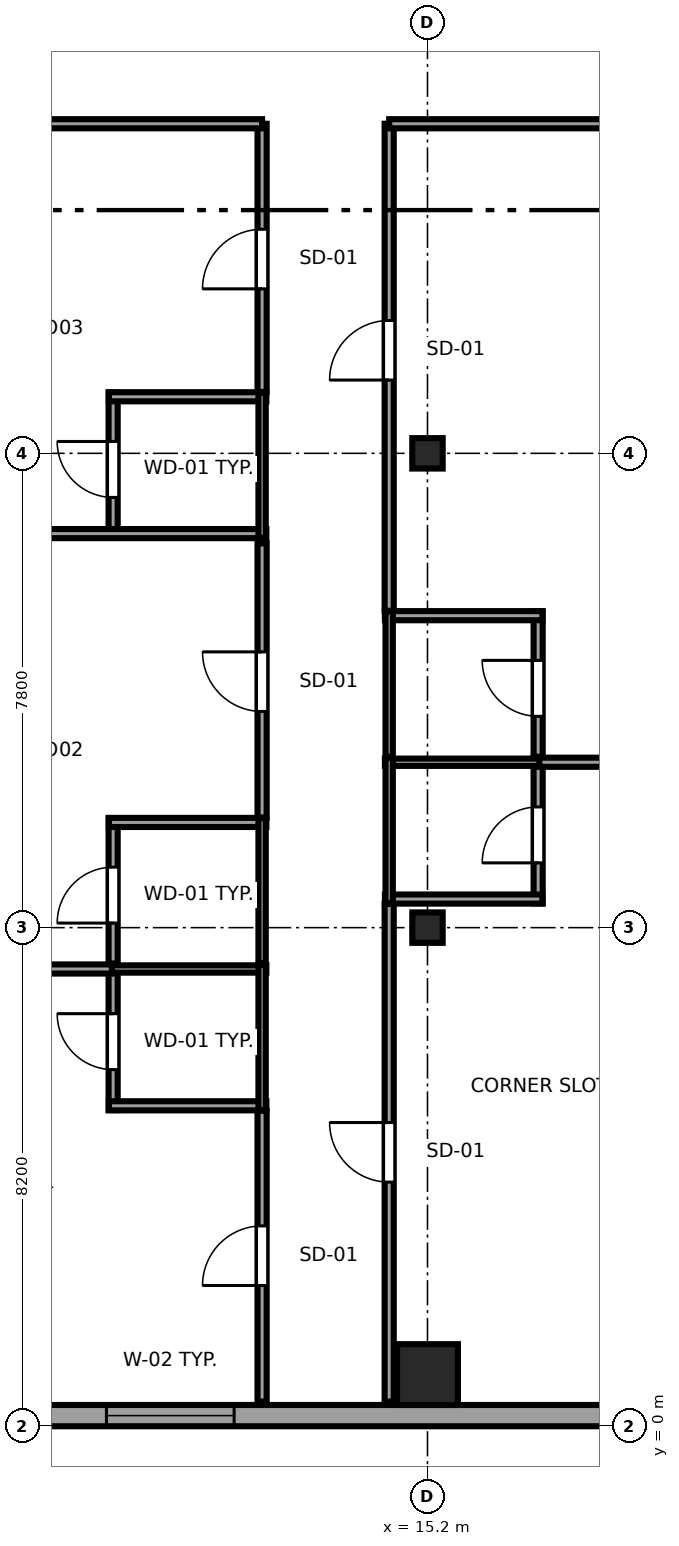
"""IFC4 building model, lengths in metres.
Left out: names, types, materials, properties, quantities, classifications, styles, units other than length and angle.
Written with IfcOpenShell. Run it as: python <this file> out.ifc"""

import sys

from ifc_helpers import new_model, si_unit, direction, frame, frame_2d, origin, origin_2d, place, context, subcontext, project, spatial, rectangle, i_section, extrude, source, transform, mapped, element, fill, save


model = new_model("IFC4")
c1 = context("Model", 3, precision=1e-05, world=origin(), true_north=direction((0.0, 1.0)))
c2 = subcontext(c1, "Body", "Model", "MODEL_VIEW")
j1 = project(units=[si_unit("LENGTHUNIT", "METRE"), si_unit("PLANEANGLEUNIT", "RADIAN")], contexts=[c1])
p1 = place(None, origin())
s1 = spatial("IfcSite", under=j1, at=p1, CompositionType="ELEMENT")
p2 = place(p1, origin())
s2 = spatial("IfcBuilding", under=s1, at=p2, CompositionType="ELEMENT")
p3 = place(p2, frame((0.0, 0.0, 53.3)))
s3 = spatial("IfcBuildingStorey", under=s2, at=p3, CompositionType="ELEMENT", Elevation=53.3)
m1 = source(origin(), c2, "Body", "SweptSolid", [
    extrude(rectangle(XDim=1.0, YDim=1.0, at=origin_2d()), origin(), (0.0, 0.0, 1.0), 3.55),
])
p4 = place(p3, frame((15.2, 0.85, 0.0), z_axis=(0.0, 0.0, 1.0), x_axis=(1.0, 0.0, 0.0)))
e1 = element("IfcColumn", 1, at=p4, inside=s3, PredefinedType="COLUMN", context=c2, shape_type="MappedRepresentation", body=[
    mapped(m1, transform((0.0, 0.0, 0.0), x_axis=(1.0, 0.0, 0.0), y_axis=(0.0, 1.0, 0.0), z_axis=(0.0, 0.0, 1.0), scale=1.0)),
])
m2 = source(origin(), c2, "Body", "SweptSolid", [
    extrude(i_section(OverallWidth=0.5, OverallDepth=0.5, WebThickness=0.028, FlangeThickness=0.045, at=origin_2d()), origin(), (0.0, 0.0, 1.0), 3.55),
])
for number, where, z_axis, x_axis in (
    (2, (15.2, 8.2, 0.0), (0.0, 0.0, 1.0), (1.0, 0.0, 0.0)),
    (3, (15.2, 16.0, 0.0), (0.0, 0.0, 1.0), (1.0, 0.0, 0.0)),
):
    element("IfcColumn", number, at=place(p3, frame(where, z_axis=z_axis, x_axis=x_axis)), inside=s3, PredefinedType="COLUMN", context=c2, shape_type="MappedRepresentation", body=[
        mapped(m2, transform((0.0, 0.0, 0.0), x_axis=(1.0, 0.0, 0.0), y_axis=(0.0, 1.0, 0.0), z_axis=(0.0, 0.0, 1.0), scale=1.0)),
    ])
p5 = place(p3, frame((4.617, 0.175, 0.0), z_axis=(0.0, 0.0, 1.0), x_axis=(1.0, 0.0, 0.0)))
e4 = element("IfcWall", 4, at=p5, inside=s3, PredefinedType="SOLIDWALL", context=c2, shape_type="SweptSolid", body=[
    extrude(rectangle(XDim=18.008, YDim=0.35, at=frame_2d((9.004, 0.0))), origin(), (0.0, 0.0, 1.0), 3.37),
])
p6 = place(p5, frame((5.303, 0.0, 0.68)))
e5 = element("IfcOpeningElement", 5, at=p6, cuts=e4, PredefinedType="OPENING", context=c2, shape_type="SweptSolid", body=[
    extrude(rectangle(XDim=2.1, YDim=1.9, at=frame_2d((1.05, 0.95))), frame((0.0, 0.185, 0.0), z_axis=(0.0, -1.0, 0.0), x_axis=(1.0, 0.0, 0.0)), (0.0, 0.0, 1.0), 0.37),
])
p7 = place(p5, frame((14.257, 0.0, 0.68)))
e6 = element("IfcOpeningElement", 6, at=p7, cuts=e4, PredefinedType="OPENING", context=c2, shape_type="SweptSolid", body=[
    extrude(rectangle(XDim=2.1, YDim=1.9, at=frame_2d((1.05, 0.95))), frame((0.0, 0.185, 0.0), z_axis=(0.0, -1.0, 0.0), x_axis=(1.0, 0.0, 0.0)), (0.0, 0.0, 1.0), 0.37),
])
p8 = place(p3, frame((10.03, 5.2, 0.0), z_axis=(0.0, 0.0, 1.0), x_axis=(0.0, 1.0, 0.0)))
e7 = element("IfcWall", 7, at=p8, inside=s3, PredefinedType="PARTITIONING", context=c2, shape_type="SweptSolid", body=[
    extrude(rectangle(XDim=2.39, YDim=0.15, at=frame_2d((1.195, 0.0))), origin(), (0.0, 0.0, 1.0), 3.37),
])
p9 = place(p8, frame((0.665, 0.0, 0.0)))
e8 = element("IfcOpeningElement", 8, at=p9, cuts=e7, PredefinedType="OPENING", context=c2, shape_type="SweptSolid", body=[
    extrude(rectangle(XDim=0.92, YDim=2.01, at=frame_2d((0.46, 1.005))), frame((0.0, 0.085, 0.0), z_axis=(0.0, -1.0, 0.0), x_axis=(1.0, 0.0, 0.0)), (0.0, 0.0, 1.0), 0.17),
])
p10 = place(p3, frame((9.96, 5.27, 0.0), z_axis=(0.0, 0.0, 1.0), x_axis=(1.0, 0.0, 0.0)))
e9 = element("IfcWall", 9, at=p10, inside=s3, PredefinedType="PARTITIONING", context=c2, shape_type="SweptSolid", body=[
    extrude(rectangle(XDim=2.59, YDim=0.15, at=frame_2d((1.295, 0.0))), origin(), (0.0, 0.0, 1.0), 3.37),
])
p11 = place(p3, frame((9.96, 7.52, 0.0), z_axis=(0.0, 0.0, 1.0), x_axis=(1.0, 0.0, 0.0)))
e10 = element("IfcWall", 10, at=p11, inside=s3, PredefinedType="PLUMBINGWALL", context=c2, shape_type="SweptSolid", body=[
    extrude(rectangle(XDim=2.59, YDim=0.12, at=frame_2d((1.295, 0.0))), origin(), (0.0, 0.0, 1.0), 3.37),
])
p12 = place(p3, frame((12.48, 5.2, 0.0), z_axis=(0.0, 0.0, 1.0), x_axis=(0.0, 1.0, 0.0)))
e11 = element("IfcWall", 11, at=p12, inside=s3, PredefinedType="PLUMBINGWALL", context=c2, shape_type="SweptSolid", body=[
    extrude(rectangle(XDim=2.39, YDim=0.12, at=frame_2d((1.195, 0.0))), origin(), (0.0, 0.0, 1.0), 3.37),
])
p13 = place(p3, frame((10.03, 7.61, 0.0), z_axis=(0.0, 0.0, 1.0), x_axis=(0.0, 1.0, 0.0)))
e12 = element("IfcWall", 12, at=p13, inside=s3, PredefinedType="PARTITIONING", context=c2, shape_type="SweptSolid", body=[
    extrude(rectangle(XDim=2.39, YDim=0.15, at=frame_2d((1.195, 0.0))), origin(), (0.0, 0.0, 1.0), 3.37),
])
p14 = place(p13, frame((0.665, 0.0, 0.0)))
e13 = element("IfcOpeningElement", 13, at=p14, cuts=e12, PredefinedType="OPENING", context=c2, shape_type="SweptSolid", body=[
    extrude(rectangle(XDim=0.92, YDim=2.01, at=frame_2d((0.46, 1.005))), frame((0.0, 0.085, 0.0), z_axis=(0.0, -1.0, 0.0), x_axis=(1.0, 0.0, 0.0)), (0.0, 0.0, 1.0), 0.17),
])
p15 = place(p3, frame((9.96, 9.93, 0.0), z_axis=(0.0, 0.0, 1.0), x_axis=(1.0, 0.0, 0.0)))
e14 = element("IfcWall", 14, at=p15, inside=s3, PredefinedType="PARTITIONING", context=c2, shape_type="SweptSolid", body=[
    extrude(rectangle(XDim=2.59, YDim=0.15, at=frame_2d((1.295, 0.0))), origin(), (0.0, 0.0, 1.0), 3.37),
])
p16 = place(p3, frame((12.48, 7.61, 0.0), z_axis=(0.0, 0.0, 1.0), x_axis=(0.0, 1.0, 0.0)))
e15 = element("IfcWall", 15, at=p16, inside=s3, PredefinedType="PLUMBINGWALL", context=c2, shape_type="SweptSolid", body=[
    extrude(rectangle(XDim=2.39, YDim=0.12, at=frame_2d((1.195, 0.0))), origin(), (0.0, 0.0, 1.0), 3.37),
])
p17 = place(p3, frame((10.03, 14.61, 0.0), z_axis=(0.0, 0.0, 1.0), x_axis=(0.0, 1.0, 0.0)))
e16 = element("IfcWall", 16, at=p17, inside=s3, PredefinedType="PARTITIONING", context=c2, shape_type="SweptSolid", body=[
    extrude(rectangle(XDim=2.39, YDim=0.15, at=frame_2d((1.195, 0.0))), origin(), (0.0, 0.0, 1.0), 3.37),
])
p18 = place(p17, frame((0.665, 0.0, 0.0)))
e17 = element("IfcOpeningElement", 17, at=p18, cuts=e16, PredefinedType="OPENING", context=c2, shape_type="SweptSolid", body=[
    extrude(rectangle(XDim=0.92, YDim=2.01, at=frame_2d((0.46, 1.005))), frame((0.0, 0.085, 0.0), z_axis=(0.0, -1.0, 0.0), x_axis=(1.0, 0.0, 0.0)), (0.0, 0.0, 1.0), 0.17),
])
p19 = place(p3, frame((0.3, 14.68, 0.0), z_axis=(0.0, 0.0, 1.0), x_axis=(1.0, 0.0, 0.0)))
e18 = element("IfcWall", 18, at=p19, inside=s3, PredefinedType="PARTITIONING", context=c2, shape_type="SweptSolid", body=[
    extrude(rectangle(XDim=12.25, YDim=0.15, at=frame_2d((6.125, 0.0))), origin(), (0.0, 0.0, 1.0), 3.37),
])
p20 = place(p3, frame((9.96, 16.93, 0.0), z_axis=(0.0, 0.0, 1.0), x_axis=(1.0, 0.0, 0.0)))
e19 = element("IfcWall", 19, at=p20, inside=s3, PredefinedType="PARTITIONING", context=c2, shape_type="SweptSolid", body=[
    extrude(rectangle(XDim=2.59, YDim=0.15, at=frame_2d((1.295, 0.0))), origin(), (0.0, 0.0, 1.0), 3.37),
])
p21 = place(p3, frame((12.48, 14.61, 0.0), z_axis=(0.0, 0.0, 1.0), x_axis=(0.0, 1.0, 0.0)))
e20 = element("IfcWall", 20, at=p21, inside=s3, PredefinedType="PLUMBINGWALL", context=c2, shape_type="SweptSolid", body=[
    extrude(rectangle(XDim=2.39, YDim=0.12, at=frame_2d((1.195, 0.0))), origin(), (0.0, 0.0, 1.0), 3.37),
])
p22 = place(p3, frame((17.02, 8.6, 0.0), z_axis=(0.0, 0.0, 1.0), x_axis=(0.0, 1.0, 0.0)))
e21 = element("IfcWall", 21, at=p22, inside=s3, PredefinedType="PARTITIONING", context=c2, shape_type="SweptSolid", body=[
    extrude(rectangle(XDim=2.39, YDim=0.15, at=frame_2d((1.195, 0.0))), origin(), (0.0, 0.0, 1.0), 3.37),
])
p23 = place(p22, frame((0.665, 0.0, 0.0)))
e22 = element("IfcOpeningElement", 22, at=p23, cuts=e21, PredefinedType="OPENING", context=c2, shape_type="SweptSolid", body=[
    extrude(rectangle(XDim=0.92, YDim=2.01, at=frame_2d((0.46, 1.005))), frame((0.0, 0.085, 0.0), z_axis=(0.0, -1.0, 0.0), x_axis=(1.0, 0.0, 0.0)), (0.0, 0.0, 1.0), 0.17),
])
p24 = place(p3, frame((14.5, 8.67, 0.0), z_axis=(0.0, 0.0, 1.0), x_axis=(1.0, 0.0, 0.0)))
e23 = element("IfcWall", 23, at=p24, inside=s3, PredefinedType="PARTITIONING", context=c2, shape_type="SweptSolid", body=[
    extrude(rectangle(XDim=2.59, YDim=0.15, at=frame_2d((1.295, 0.0))), origin(), (0.0, 0.0, 1.0), 3.37),
])
p25 = place(p3, frame((14.5, 10.92, 0.0), z_axis=(0.0, 0.0, 1.0), x_axis=(1.0, 0.0, 0.0)))
e24 = element("IfcWall", 24, at=p25, inside=s3, PredefinedType="PLUMBINGWALL", context=c2, shape_type="SweptSolid", body=[
    extrude(rectangle(XDim=2.59, YDim=0.12, at=frame_2d((1.295, 0.0))), origin(), (0.0, 0.0, 1.0), 3.37),
])
p26 = place(p3, frame((14.57, 8.6, 0.0), z_axis=(0.0, 0.0, 1.0), x_axis=(0.0, 1.0, 0.0)))
e25 = element("IfcWall", 25, at=p26, inside=s3, PredefinedType="PLUMBINGWALL", context=c2, shape_type="SweptSolid", body=[
    extrude(rectangle(XDim=2.39, YDim=0.12, at=frame_2d((1.195, 0.0))), origin(), (0.0, 0.0, 1.0), 3.37),
])
p27 = place(p3, frame((17.02, 11.01, 0.0), z_axis=(0.0, 0.0, 1.0), x_axis=(0.0, 1.0, 0.0)))
e26 = element("IfcWall", 26, at=p27, inside=s3, PredefinedType="PARTITIONING", context=c2, shape_type="SweptSolid", body=[
    extrude(rectangle(XDim=2.39, YDim=0.15, at=frame_2d((1.195, 0.0))), origin(), (0.0, 0.0, 1.0), 3.37),
])
p28 = place(p27, frame((0.665, 0.0, 0.0)))
e27 = element("IfcOpeningElement", 27, at=p28, cuts=e26, PredefinedType="OPENING", context=c2, shape_type="SweptSolid", body=[
    extrude(rectangle(XDim=0.92, YDim=2.01, at=frame_2d((0.46, 1.005))), frame((0.0, 0.085, 0.0), z_axis=(0.0, -1.0, 0.0), x_axis=(1.0, 0.0, 0.0)), (0.0, 0.0, 1.0), 0.17),
])
p29 = place(p3, frame((14.5, 13.33, 0.0), z_axis=(0.0, 0.0, 1.0), x_axis=(1.0, 0.0, 0.0)))
e28 = element("IfcWall", 28, at=p29, inside=s3, PredefinedType="PARTITIONING", context=c2, shape_type="SweptSolid", body=[
    extrude(rectangle(XDim=2.59, YDim=0.15, at=frame_2d((1.295, 0.0))), origin(), (0.0, 0.0, 1.0), 3.37),
])
p30 = place(p3, frame((14.57, 11.01, 0.0), z_axis=(0.0, 0.0, 1.0), x_axis=(0.0, 1.0, 0.0)))
e29 = element("IfcWall", 29, at=p30, inside=s3, PredefinedType="PLUMBINGWALL", context=c2, shape_type="SweptSolid", body=[
    extrude(rectangle(XDim=2.39, YDim=0.12, at=frame_2d((1.195, 0.0))), origin(), (0.0, 0.0, 1.0), 3.37),
])
p31 = place(p3, frame((12.48, 0.405, 0.0), z_axis=(0.0, 0.0, 1.0), x_axis=(0.0, 1.0, 0.0)))
e30 = element("IfcWall", 30, at=p31, inside=s3, PredefinedType="PARTITIONING", context=c2, shape_type="SweptSolid", body=[
    extrude(rectangle(XDim=4.785, YDim=0.15, at=frame_2d((2.393, 0.0))), origin(), (0.0, 0.0, 1.0), 3.37),
])
p32 = place(p31, frame((1.91, 0.0, 0.0)))
e31 = element("IfcOpeningElement", 31, at=p32, cuts=e30, PredefinedType="OPENING", context=c2, shape_type="SweptSolid", body=[
    extrude(rectangle(XDim=0.98, YDim=2.12, at=frame_2d((0.49, 1.06))), frame((0.0, 0.085, 0.0), z_axis=(0.0, -1.0, 0.0), x_axis=(1.0, 0.0, 0.0)), (0.0, 0.0, 1.0), 0.17),
])
p33 = place(p3, frame((0.3, 7.52, 0.0), z_axis=(0.0, 0.0, 1.0), x_axis=(1.0, 0.0, 0.0)))
e32 = element("IfcWall", 32, at=p33, inside=s3, PredefinedType="PARTITIONING", context=c2, shape_type="SweptSolid", body=[
    extrude(rectangle(XDim=9.71, YDim=0.15, at=frame_2d((4.855, 0.0))), origin(), (0.0, 0.0, 1.0), 3.37),
])
p34 = place(p3, frame((12.48, 10.01, 0.0), z_axis=(0.0, 0.0, 1.0), x_axis=(0.0, 1.0, 0.0)))
e33 = element("IfcWall", 33, at=p34, inside=s3, PredefinedType="PARTITIONING", context=c2, shape_type="SweptSolid", body=[
    extrude(rectangle(XDim=4.51, YDim=0.15, at=frame_2d((2.255, 0.0))), origin(), (0.0, 0.0, 1.0), 3.37),
])
p35 = place(p34, frame((1.745, 0.0, 0.0)))
e34 = element("IfcOpeningElement", 34, at=p35, cuts=e33, PredefinedType="OPENING", context=c2, shape_type="SweptSolid", body=[
    extrude(rectangle(XDim=0.98, YDim=2.12, at=frame_2d((0.49, 1.06))), frame((0.0, 0.085, 0.0), z_axis=(0.0, -1.0, 0.0), x_axis=(1.0, 0.0, 0.0)), (0.0, 0.0, 1.0), 0.17),
])
p36 = place(p3, frame((12.48, 17.01, 0.0), z_axis=(0.0, 0.0, 1.0), x_axis=(0.0, 1.0, 0.0)))
e35 = element("IfcWall", 35, at=p36, inside=s3, PredefinedType="PARTITIONING", context=c2, shape_type="SweptSolid", body=[
    extrude(rectangle(XDim=4.41, YDim=0.15, at=frame_2d((2.205, 0.0))), origin(), (0.0, 0.0, 1.0), 3.37),
])
p37 = place(p36, frame((1.695, 0.0, 0.0)))
e36 = element("IfcOpeningElement", 36, at=p37, cuts=e35, PredefinedType="OPENING", context=c2, shape_type="SweptSolid", body=[
    extrude(rectangle(XDim=0.98, YDim=2.12, at=frame_2d((0.49, 1.06))), frame((0.0, 0.085, 0.0), z_axis=(0.0, -1.0, 0.0), x_axis=(1.0, 0.0, 0.0)), (0.0, 0.0, 1.0), 0.17),
])
p38 = place(p3, frame((0.3, 21.42, 0.0), z_axis=(0.0, 0.0, 1.0), x_axis=(1.0, 0.0, 0.0)))
e37 = element("IfcWall", 37, at=p38, inside=s3, PredefinedType="PARTITIONING", context=c2, shape_type="SweptSolid", body=[
    extrude(rectangle(XDim=12.18, YDim=0.15, at=frame_2d((6.09, 0.0))), origin(), (0.0, 0.0, 1.0), 3.37),
])
p39 = place(p3, frame((14.57, 0.405, 0.0), z_axis=(0.0, 0.0, 1.0), x_axis=(0.0, 1.0, 0.0)))
e38 = element("IfcWall", 38, at=p39, inside=s3, PredefinedType="PARTITIONING", context=c2, shape_type="SweptSolid", body=[
    extrude(rectangle(XDim=8.185, YDim=0.15, at=frame_2d((4.093, 0.0))), origin(), (0.0, 0.0, 1.0), 3.37),
])
p40 = place(p39, frame((3.61, 0.0, 0.0)))
e39 = element("IfcOpeningElement", 39, at=p40, cuts=e38, PredefinedType="OPENING", context=c2, shape_type="SweptSolid", body=[
    extrude(rectangle(XDim=0.98, YDim=2.12, at=frame_2d((0.49, 1.06))), frame((0.0, 0.085, 0.0), z_axis=(0.0, -1.0, 0.0), x_axis=(1.0, 0.0, 0.0)), (0.0, 0.0, 1.0), 0.17),
])
p41 = place(p3, frame((17.04, 10.92, 0.0), z_axis=(0.0, 0.0, 1.0), x_axis=(1.0, 0.0, 0.0)))
e40 = element("IfcWall", 40, at=p41, inside=s3, PredefinedType="PARTITIONING", context=c2, shape_type="SweptSolid", body=[
    extrude(rectangle(XDim=5.31, YDim=0.15, at=frame_2d((2.655, 0.0))), origin(), (0.0, 0.0, 1.0), 3.37),
])
p42 = place(p3, frame((14.57, 13.41, 0.0), z_axis=(0.0, 0.0, 1.0), x_axis=(0.0, 1.0, 0.0)))
e41 = element("IfcWall", 41, at=p42, inside=s3, PredefinedType="PARTITIONING", context=c2, shape_type="SweptSolid", body=[
    extrude(rectangle(XDim=8.01, YDim=0.15, at=frame_2d((4.005, 0.0))), origin(), (0.0, 0.0, 1.0), 3.37),
])
p43 = place(p42, frame((3.795, 0.0, 0.0)))
e42 = element("IfcOpeningElement", 42, at=p43, cuts=e41, PredefinedType="OPENING", context=c2, shape_type="SweptSolid", body=[
    extrude(rectangle(XDim=0.98, YDim=2.12, at=frame_2d((0.49, 1.06))), frame((0.0, 0.085, 0.0), z_axis=(0.0, -1.0, 0.0), x_axis=(1.0, 0.0, 0.0)), (0.0, 0.0, 1.0), 0.17),
])
p44 = place(p3, frame((14.57, 21.42, 0.0), z_axis=(0.0, 0.0, 1.0), x_axis=(1.0, 0.0, 0.0)))
e43 = element("IfcWall", 43, at=p44, inside=s3, PredefinedType="PARTITIONING", context=c2, shape_type="SweptSolid", body=[
    extrude(rectangle(XDim=7.78, YDim=0.15, at=frame_2d((3.89, 0.0))), origin(), (0.0, 0.0, 1.0), 3.37),
])
m3 = source(origin(), c2, "Body", "SweptSolid", [
    extrude(rectangle(XDim=2.1, YDim=1.9, at=frame_2d((1.05, 0.95))), frame((0.0, 0.09, 0.0), z_axis=(0.0, -1.0, 0.0), x_axis=(1.0, 0.0, 0.0)), (0.0, 0.0, 1.0), 0.06),
])
p45 = place(p6, origin())
e44 = element("IfcWindow", 44, at=p45, inside=s3, PartitioningType="TRIPLE_PANEL_HORIZONTAL", PredefinedType="WINDOW", context=c2, shape_type="MappedRepresentation", body=[
    mapped(m3, transform((0.0, 0.0, 0.0), x_axis=(1.0, 0.0, 0.0), y_axis=(0.0, 1.0, 0.0), z_axis=(0.0, 0.0, 1.0), scale=1.0)),
])
fill(e5, e44)
m4 = source(origin(), c2, "Body", "SweptSolid", [
    extrude(rectangle(XDim=0.92, YDim=2.01, at=frame_2d((0.46, 1.005))), frame((0.0, 0.025, 0.0), z_axis=(0.0, -1.0, 0.0), x_axis=(1.0, 0.0, 0.0)), (0.0, 0.0, 1.0), 0.05),
])
p46 = place(p9, origin())
e45 = element("IfcDoor", 45, at=p46, inside=s3, OperationType="SINGLE_SWING_RIGHT", PredefinedType="DOOR", context=c2, shape_type="MappedRepresentation", body=[
    mapped(m4, transform((0.0, 0.0, 0.0), x_axis=(1.0, 0.0, 0.0), y_axis=(0.0, 1.0, 0.0), z_axis=(0.0, 0.0, 1.0), scale=1.0)),
])
fill(e8, e45)
p47 = place(p14, origin())
e46 = element("IfcDoor", 46, at=p47, inside=s3, OperationType="SINGLE_SWING_LEFT", PredefinedType="DOOR", context=c2, shape_type="MappedRepresentation", body=[
    mapped(m4, transform((0.0, 0.0, 0.0), x_axis=(1.0, 0.0, 0.0), y_axis=(0.0, 1.0, 0.0), z_axis=(0.0, 0.0, 1.0), scale=1.0)),
])
fill(e13, e46)
p48 = place(p18, origin())
e47 = element("IfcDoor", 47, at=p48, inside=s3, OperationType="SINGLE_SWING_RIGHT", PredefinedType="DOOR", context=c2, shape_type="MappedRepresentation", body=[
    mapped(m4, transform((0.0, 0.0, 0.0), x_axis=(1.0, 0.0, 0.0), y_axis=(0.0, 1.0, 0.0), z_axis=(0.0, 0.0, 1.0), scale=1.0)),
])
fill(e17, e47)
p49 = place(p23, origin())
e48 = element("IfcDoor", 48, at=p49, inside=s3, OperationType="SINGLE_SWING_LEFT", PredefinedType="DOOR", context=c2, shape_type="MappedRepresentation", body=[
    mapped(m4, transform((0.0, 0.0, 0.0), x_axis=(1.0, 0.0, 0.0), y_axis=(0.0, 1.0, 0.0), z_axis=(0.0, 0.0, 1.0), scale=1.0)),
])
fill(e22, e48)
p50 = place(p28, origin())
e49 = element("IfcDoor", 49, at=p50, inside=s3, OperationType="SINGLE_SWING_RIGHT", PredefinedType="DOOR", context=c2, shape_type="MappedRepresentation", body=[
    mapped(m4, transform((0.0, 0.0, 0.0), x_axis=(1.0, 0.0, 0.0), y_axis=(0.0, 1.0, 0.0), z_axis=(0.0, 0.0, 1.0), scale=1.0)),
])
fill(e27, e49)
m5 = source(origin(), c2, "Body", "SweptSolid", [
    extrude(rectangle(XDim=0.98, YDim=2.12, at=frame_2d((0.49, 1.06))), frame((0.0, 0.025, 0.0), z_axis=(0.0, -1.0, 0.0), x_axis=(1.0, 0.0, 0.0)), (0.0, 0.0, 1.0), 0.05),
])
p51 = place(p32, origin())
e50 = element("IfcDoor", 50, at=p51, inside=s3, OperationType="SINGLE_SWING_LEFT", PredefinedType="DOOR", context=c2, shape_type="MappedRepresentation", body=[
    mapped(m5, transform((0.0, 0.0, 0.0), x_axis=(1.0, 0.0, 0.0), y_axis=(0.0, 1.0, 0.0), z_axis=(0.0, 0.0, 1.0), scale=1.0)),
])
fill(e31, e50)
p52 = place(p35, origin())
e51 = element("IfcDoor", 51, at=p52, inside=s3, OperationType="SINGLE_SWING_RIGHT", PredefinedType="DOOR", context=c2, shape_type="MappedRepresentation", body=[
    mapped(m5, transform((0.0, 0.0, 0.0), x_axis=(1.0, 0.0, 0.0), y_axis=(0.0, 1.0, 0.0), z_axis=(0.0, 0.0, 1.0), scale=1.0)),
])
fill(e34, e51)
p53 = place(p37, origin())
e52 = element("IfcDoor", 52, at=p53, inside=s3, OperationType="SINGLE_SWING_LEFT", PredefinedType="DOOR", context=c2, shape_type="MappedRepresentation", body=[
    mapped(m5, transform((0.0, 0.0, 0.0), x_axis=(1.0, 0.0, 0.0), y_axis=(0.0, 1.0, 0.0), z_axis=(0.0, 0.0, 1.0), scale=1.0)),
])
fill(e36, e52)
p54 = place(p40, origin())
e53 = element("IfcDoor", 53, at=p54, inside=s3, OperationType="SINGLE_SWING_RIGHT", PredefinedType="DOOR", context=c2, shape_type="MappedRepresentation", body=[
    mapped(m5, transform((0.0, 0.0, 0.0), x_axis=(1.0, 0.0, 0.0), y_axis=(0.0, 1.0, 0.0), z_axis=(0.0, 0.0, 1.0), scale=1.0)),
])
fill(e39, e53)
p55 = place(p43, origin())
e54 = element("IfcDoor", 54, at=p55, inside=s3, OperationType="SINGLE_SWING_LEFT", PredefinedType="DOOR", context=c2, shape_type="MappedRepresentation", body=[
    mapped(m5, transform((0.0, 0.0, 0.0), x_axis=(1.0, 0.0, 0.0), y_axis=(0.0, 1.0, 0.0), z_axis=(0.0, 0.0, 1.0), scale=1.0)),
])
fill(e42, e54)
save(model, sys.argv[1])
